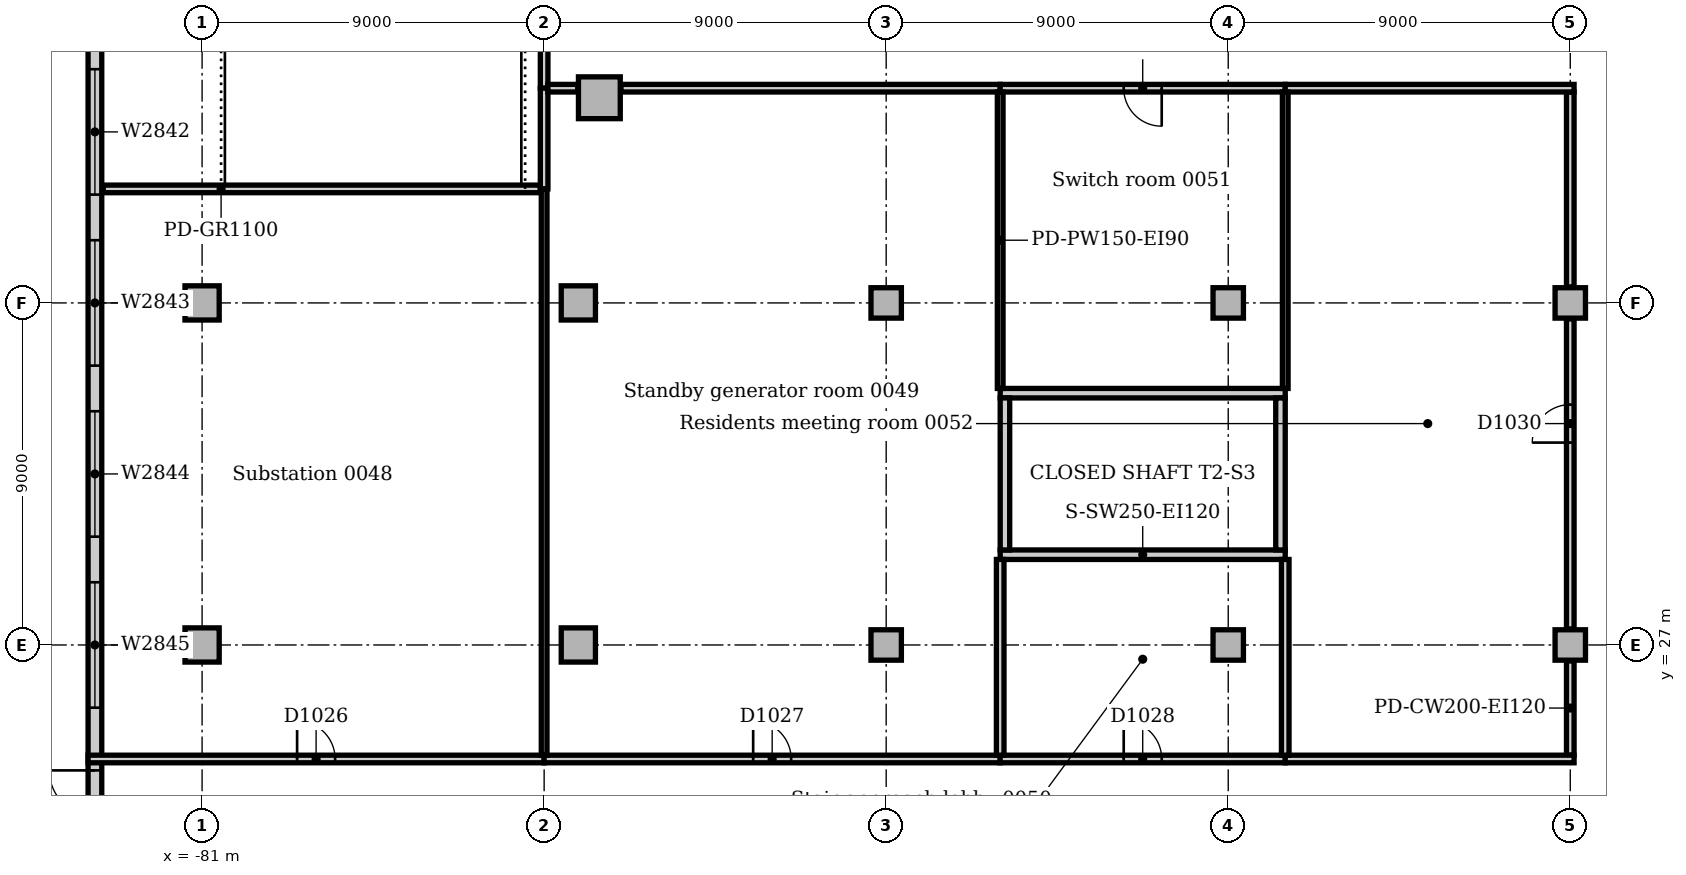
"""IFC4 building model, lengths in metres.
Left out: names, types, materials, properties, quantities, classifications, styles, units other than length and angle.
Written with IfcOpenShell. Run it as: python <this file> out.ifc"""

import sys

from ifc_helpers import new_model, si_unit, direction, frame, frame_2d, origin, origin_2d, place, context, subcontext, project, spatial, rectangle, extrude, element, fill, save


model = new_model("IFC4")
c1 = context("Model", 3, precision=1e-05, world=origin(), true_north=direction((0.0, 1.0)))
c2 = subcontext(c1, "Body", "Model", "MODEL_VIEW")
j1 = project(units=[si_unit("LENGTHUNIT", "METRE"), si_unit("PLANEANGLEUNIT", "RADIAN")], contexts=[c1])
p1 = place(None, origin())
s1 = spatial("IfcSite", under=j1, at=p1, CompositionType="ELEMENT")
p2 = place(p1, origin())
s2 = spatial("IfcBuilding", under=s1, at=p2, CompositionType="ELEMENT")
p3 = place(p2, origin())
s3 = spatial("IfcBuildingStorey", under=s2, at=p3, CompositionType="ELEMENT", Elevation=0.0)
for number, where, z_axis, x_axis in (
    (1, (-60.0, 29.375, 0.0), (0.0, 0.0, 1.0), (1.0, 0.0, 0.0)),
    (2, (-52.5, 33.625, 0.0), (0.0, 0.0, 1.0), (-1.0, 0.0, 0.0)),
):
    element("IfcWall", number, at=place(p3, frame(where, z_axis=z_axis, x_axis=x_axis)), inside=s3, PredefinedType="SOLIDWALL", context=c2, shape_type="SweptSolid", body=[
        extrude(rectangle(XDim=7.5, YDim=0.25, at=frame_2d((3.75, 0.0))), origin(), (0.0, 0.0, 1.0), 6.0),
    ])
for number, where, z_axis, x_axis in (
    (3, (-52.625, 29.5, 0.0), (0.0, 0.0, 1.0), (0.0, 1.0, 0.0)),
    (4, (-59.875, 33.5, 0.0), (0.0, 0.0, 1.0), (0.0, -1.0, 0.0)),
):
    element("IfcWall", number, at=place(p3, frame(where, z_axis=z_axis, x_axis=x_axis)), inside=s3, PredefinedType="SOLIDWALL", context=c2, shape_type="SweptSolid", body=[
        extrude(rectangle(XDim=4.0, YDim=0.25, at=frame_2d((2.0, 0.0))), origin(), (0.0, 0.0, 1.0), 6.0),
    ])
p4 = place(p3, frame((-70.547, 41.398, 0.0), z_axis=(0.0, 0.0, 1.0), x_axis=(1.0, 0.0, 0.0)))
e5 = element("IfcColumn", 5, at=p4, inside=s3, PredefinedType="COLUMN", context=c2, shape_type="SweptSolid", body=[
    extrude(rectangle(XDim=1.1, YDim=1.1, at=origin_2d()), origin(), (0.0, 0.0, 1.0), 5.7),
])
for number, where, z_axis, x_axis in (
    (6, (-71.1, 27.0, 0.0), (0.0, 0.0, 1.0), (1.0, 0.0, 0.0)),
    (7, (-71.1, 36.0, 0.0), (0.0, 0.0, 1.0), (1.0, 0.0, 0.0)),
):
    element("IfcColumn", number, at=place(p3, frame(where, z_axis=z_axis, x_axis=x_axis)), inside=s3, PredefinedType="COLUMN", context=c2, shape_type="SweptSolid", body=[
        extrude(rectangle(XDim=0.9, YDim=0.9, at=origin_2d()), origin(), (0.0, 0.0, 1.0), 5.7),
    ])
for number, where, z_axis, x_axis in (
    (8, (-63.0, 27.0, 0.0), (0.0, 0.0, 1.0), (1.0, 0.0, 0.0)),
    (9, (-63.0, 36.0, 0.0), (0.0, 0.0, 1.0), (1.0, 0.0, 0.0)),
    (10, (-54.0, 27.0, 0.0), (0.0, 0.0, 1.0), (1.0, 0.0, 0.0)),
    (11, (-54.0, 36.0, 0.0), (0.0, 0.0, 1.0), (1.0, 0.0, 0.0)),
    (12, (-45.0, 27.0, 0.0), (0.0, 0.0, 1.0), (1.0, 0.0, 0.0)),
    (13, (-45.0, 36.0, 0.0), (0.0, 0.0, 1.0), (1.0, 0.0, 0.0)),
):
    element("IfcColumn", number, at=place(p3, frame(where, z_axis=z_axis, x_axis=x_axis)), inside=s3, PredefinedType="COLUMN", context=c2, shape_type="SweptSolid", body=[
        extrude(rectangle(XDim=0.8, YDim=0.8, at=origin_2d()), origin(), (0.0, 0.0, 1.0), 5.7),
    ])
for number, where, z_axis, x_axis in (
    (14, (-81.0, 27.0, 0.0), (0.0, 0.0, 1.0), (1.0, 0.0, 0.0)),
    (15, (-81.0, 36.0, 0.0), (0.0, 0.0, 1.0), (1.0, 0.0, 0.0)),
):
    element("IfcColumn", number, at=place(p3, frame(where, z_axis=z_axis, x_axis=x_axis)), inside=s3, PredefinedType="COLUMN", context=c2, shape_type="SweptSolid", body=[
        extrude(rectangle(XDim=0.9, YDim=0.9, at=origin_2d()), origin(), (0.0, 0.0, 1.0), 5.7),
    ])
p5 = place(p3, frame((-83.82, 54.0, 0.0), z_axis=(0.0, 0.0, 1.0), x_axis=(0.0, -1.0, 0.0)))
e16 = element("IfcWall", 16, at=p5, inside=s3, PredefinedType="STANDARD", context=c2, shape_type="SweptSolid", body=[
    extrude(rectangle(XDim=63.0, YDim=0.36, at=frame_2d((31.5, 0.0))), origin(), (0.0, 0.0, 1.0), 5.7),
])
p6 = place(p5, frame((41.4, 0.0, 0.0)))
e17 = element("IfcOpeningElement", 17, at=p6, cuts=e16, PredefinedType="OPENING", context=c2, shape_type="SweptSolid", body=[
    extrude(rectangle(XDim=1.2, YDim=2.2, at=frame_2d((0.6, 1.1))), frame((0.0, 0.19, 0.0), z_axis=(0.0, -1.0, 0.0), x_axis=(1.0, 0.0, 0.0)), (0.0, 0.0, 1.0), 0.38),
])
p7 = place(p5, frame((30.3, 0.0, 0.0)))
e18 = element("IfcOpeningElement", 18, at=p7, cuts=e16, PredefinedType="OPENING", context=c2, shape_type="SweptSolid", body=[
    extrude(rectangle(XDim=2.4, YDim=2.2, at=frame_2d((1.2, 1.1))), frame((0.0, 0.19, 0.0), z_axis=(0.0, -1.0, 0.0), x_axis=(1.0, 0.0, 0.0)), (0.0, 0.0, 1.0), 0.38),
])
p8 = place(p5, frame((11.85, 0.0, 0.6)))
e19 = element("IfcOpeningElement", 19, at=p8, cuts=e16, PredefinedType="OPENING", context=c2, shape_type="SweptSolid", body=[
    extrude(rectangle(XDim=3.3, YDim=3.0, at=frame_2d((1.65, 1.5))), frame((0.0, 0.19, 0.0), z_axis=(0.0, -1.0, 0.0), x_axis=(1.0, 0.0, 0.0)), (0.0, 0.0, 1.0), 0.38),
])
p9 = place(p5, frame((16.35, 0.0, 0.6)))
e20 = element("IfcOpeningElement", 20, at=p9, cuts=e16, PredefinedType="OPENING", context=c2, shape_type="SweptSolid", body=[
    extrude(rectangle(XDim=3.3, YDim=3.0, at=frame_2d((1.65, 1.5))), frame((0.0, 0.19, 0.0), z_axis=(0.0, -1.0, 0.0), x_axis=(1.0, 0.0, 0.0)), (0.0, 0.0, 1.0), 0.38),
])
p10 = place(p5, frame((20.85, 0.0, 0.6)))
e21 = element("IfcOpeningElement", 21, at=p10, cuts=e16, PredefinedType="OPENING", context=c2, shape_type="SweptSolid", body=[
    extrude(rectangle(XDim=3.3, YDim=3.0, at=frame_2d((1.65, 1.5))), frame((0.0, 0.19, 0.0), z_axis=(0.0, -1.0, 0.0), x_axis=(1.0, 0.0, 0.0)), (0.0, 0.0, 1.0), 0.38),
])
p11 = place(p5, frame((25.35, 0.0, 0.6)))
e22 = element("IfcOpeningElement", 22, at=p11, cuts=e16, PredefinedType="OPENING", context=c2, shape_type="SweptSolid", body=[
    extrude(rectangle(XDim=3.3, YDim=3.0, at=frame_2d((1.65, 1.5))), frame((0.0, 0.19, 0.0), z_axis=(0.0, -1.0, 0.0), x_axis=(1.0, 0.0, 0.0)), (0.0, 0.0, 1.0), 0.38),
])
p12 = place(p5, frame((34.35, 0.0, 0.6)))
e23 = element("IfcOpeningElement", 23, at=p12, cuts=e16, PredefinedType="OPENING", context=c2, shape_type="SweptSolid", body=[
    extrude(rectangle(XDim=3.3, YDim=3.0, at=frame_2d((1.65, 1.5))), frame((0.0, 0.19, 0.0), z_axis=(0.0, -1.0, 0.0), x_axis=(1.0, 0.0, 0.0)), (0.0, 0.0, 1.0), 0.38),
])
p13 = place(p5, frame((43.35, 0.0, 0.6)))
e24 = element("IfcOpeningElement", 24, at=p13, cuts=e16, PredefinedType="OPENING", context=c2, shape_type="SweptSolid", body=[
    extrude(rectangle(XDim=3.3, YDim=3.0, at=frame_2d((1.65, 1.5))), frame((0.0, 0.19, 0.0), z_axis=(0.0, -1.0, 0.0), x_axis=(1.0, 0.0, 0.0)), (0.0, 0.0, 1.0), 0.38),
])
p14 = place(p5, frame((47.85, 0.0, 0.6)))
e25 = element("IfcOpeningElement", 25, at=p14, cuts=e16, PredefinedType="OPENING", context=c2, shape_type="SweptSolid", body=[
    extrude(rectangle(XDim=3.3, YDim=3.0, at=frame_2d((1.65, 1.5))), frame((0.0, 0.19, 0.0), z_axis=(0.0, -1.0, 0.0), x_axis=(1.0, 0.0, 0.0)), (0.0, 0.0, 1.0), 0.38),
])
p15 = place(p5, frame((52.35, 0.0, 0.6)))
e26 = element("IfcOpeningElement", 26, at=p15, cuts=e16, PredefinedType="OPENING", context=c2, shape_type="SweptSolid", body=[
    extrude(rectangle(XDim=3.3, YDim=3.0, at=frame_2d((1.65, 1.5))), frame((0.0, 0.19, 0.0), z_axis=(0.0, -1.0, 0.0), x_axis=(1.0, 0.0, 0.0)), (0.0, 0.0, 1.0), 0.38),
])
p16 = place(p5, frame((56.85, 0.0, 0.6)))
e27 = element("IfcOpeningElement", 27, at=p16, cuts=e16, PredefinedType="OPENING", context=c2, shape_type="SweptSolid", body=[
    extrude(rectangle(XDim=3.3, YDim=3.0, at=frame_2d((1.65, 1.5))), frame((0.0, 0.19, 0.0), z_axis=(0.0, -1.0, 0.0), x_axis=(1.0, 0.0, 0.0)), (0.0, 0.0, 1.0), 0.38),
])
p17 = place(p3, frame((-72.0, 41.65, 0.0), z_axis=(0.0, 0.0, 1.0), x_axis=(0.0, 1.0, 0.0)))
e28 = element("IfcWall", 28, at=p17, inside=s3, PredefinedType="PARTITIONING", context=c2, shape_type="SweptSolid", body=[
    extrude(rectangle(XDim=3.35, YDim=0.2, at=frame_2d((1.675, 0.0))), origin(), (0.0, 0.0, 1.0), 5.7),
])
p18 = place(p3, frame((-83.6, 39.0, 0.0), z_axis=(0.0, 0.0, 1.0), x_axis=(1.0, 0.0, 0.0)))
e29 = element("IfcWall", 29, at=p18, inside=s3, PredefinedType="PARTITIONING", context=c2, shape_type="SweptSolid", body=[
    extrude(rectangle(XDim=11.5, YDim=0.2, at=frame_2d((5.75, 0.0))), origin(), (0.0, 0.0, 1.0), 5.7),
])
p19 = place(p3, frame((-72.0, 39.0, 0.0), z_axis=(0.0, 0.0, 1.0), x_axis=(0.0, 1.0, 0.0)))
e30 = element("IfcWall", 30, at=p19, inside=s3, PredefinedType="PARTITIONING", context=c2, shape_type="SweptSolid", body=[
    extrude(rectangle(XDim=2.65, YDim=0.2, at=frame_2d((1.325, 0.0))), origin(), (0.0, 0.0, 1.0), 5.7),
])
p20 = place(p3, frame((-45.0, 24.1, 0.0), z_axis=(0.0, 0.0, 1.0), x_axis=(0.0, 1.0, 0.0)))
e31 = element("IfcWall", 31, at=p20, inside=s3, PredefinedType="PARTITIONING", context=c2, shape_type="SweptSolid", body=[
    extrude(rectangle(XDim=2.48, YDim=0.2, at=frame_2d((1.24, 0.0))), origin(), (0.0, 0.0, 1.0), 5.7),
])
p21 = place(p3, frame((-45.0, 27.42, 0.0), z_axis=(0.0, 0.0, 1.0), x_axis=(0.0, 1.0, 0.0)))
e32 = element("IfcWall", 32, at=p21, inside=s3, PredefinedType="PARTITIONING", context=c2, shape_type="SweptSolid", body=[
    extrude(rectangle(XDim=8.16, YDim=0.2, at=frame_2d((4.08, 0.0))), origin(), (0.0, 0.0, 1.0), 5.7),
])
p22 = place(p21, frame((4.905, 0.0, 0.0)))
e33 = element("IfcOpeningElement", 33, at=p22, cuts=e32, PredefinedType="OPENING", context=c2, shape_type="SweptSolid", body=[
    extrude(rectangle(XDim=1.0, YDim=2.1, at=frame_2d((0.5, 1.05))), frame((0.0, 0.11, 0.0), z_axis=(0.0, -1.0, 0.0), x_axis=(1.0, 0.0, 0.0)), (0.0, 0.0, 1.0), 0.22),
])
p23 = place(p3, frame((-45.0, 36.42, 0.0), z_axis=(0.0, 0.0, 1.0), x_axis=(0.0, 1.0, 0.0)))
e34 = element("IfcWall", 34, at=p23, inside=s3, PredefinedType="PARTITIONING", context=c2, shape_type="SweptSolid", body=[
    extrude(rectangle(XDim=5.13, YDim=0.2, at=frame_2d((2.565, 0.0))), origin(), (0.0, 0.0, 1.0), 5.7),
])
p24 = place(p3, frame((-84.0, 24.0, 0.0), z_axis=(0.0, 0.0, 1.0), x_axis=(1.0, 0.0, 0.0)))
e35 = element("IfcWall", 35, at=p24, inside=s3, PredefinedType="PARTITIONING", context=c2, shape_type="SweptSolid", body=[
    extrude(rectangle(XDim=12.0, YDim=0.2, at=frame_2d((6.0, 0.0))), origin(), (0.0, 0.0, 1.0), 5.7),
])
p25 = place(p24, frame((5.5, 0.0, 0.0)))
e36 = element("IfcOpeningElement", 36, at=p25, cuts=e35, PredefinedType="OPENING", context=c2, shape_type="SweptSolid", body=[
    extrude(rectangle(XDim=1.0, YDim=2.1, at=frame_2d((0.5, 1.05))), frame((0.0, 0.11, 0.0), z_axis=(0.0, -1.0, 0.0), x_axis=(1.0, 0.0, 0.0)), (0.0, 0.0, 1.0), 0.22),
])
p26 = place(p3, frame((-72.0, 24.0, 0.0), z_axis=(0.0, 0.0, 1.0), x_axis=(1.0, 0.0, 0.0)))
e37 = element("IfcWall", 37, at=p26, inside=s3, PredefinedType="PARTITIONING", context=c2, shape_type="SweptSolid", body=[
    extrude(rectangle(XDim=12.0, YDim=0.2, at=frame_2d((6.0, 0.0))), origin(), (0.0, 0.0, 1.0), 5.7),
])
p27 = place(p26, frame((5.5, 0.0, 0.0)))
e38 = element("IfcOpeningElement", 38, at=p27, cuts=e37, PredefinedType="OPENING", context=c2, shape_type="SweptSolid", body=[
    extrude(rectangle(XDim=1.0, YDim=2.1, at=frame_2d((0.5, 1.05))), frame((0.0, 0.11, 0.0), z_axis=(0.0, -1.0, 0.0), x_axis=(1.0, 0.0, 0.0)), (0.0, 0.0, 1.0), 0.22),
])
p28 = place(p3, frame((-60.0, 24.0, 0.0), z_axis=(0.0, 0.0, 1.0), x_axis=(1.0, 0.0, 0.0)))
e39 = element("IfcWall", 39, at=p28, inside=s3, PredefinedType="PARTITIONING", context=c2, shape_type="SweptSolid", body=[
    extrude(rectangle(XDim=7.5, YDim=0.2, at=frame_2d((3.75, 0.0))), origin(), (0.0, 0.0, 1.0), 5.7),
])
p29 = place(p28, frame((3.25, 0.0, 0.0)))
e40 = element("IfcOpeningElement", 40, at=p29, cuts=e39, PredefinedType="OPENING", context=c2, shape_type="SweptSolid", body=[
    extrude(rectangle(XDim=1.0, YDim=2.1, at=frame_2d((0.5, 1.05))), frame((0.0, 0.11, 0.0), z_axis=(0.0, -1.0, 0.0), x_axis=(1.0, 0.0, 0.0)), (0.0, 0.0, 1.0), 0.22),
])
p30 = place(p3, frame((-52.5, 24.0, 0.0), z_axis=(0.0, 0.0, 1.0), x_axis=(1.0, 0.0, 0.0)))
e41 = element("IfcWall", 41, at=p30, inside=s3, PredefinedType="PARTITIONING", context=c2, shape_type="SweptSolid", body=[
    extrude(rectangle(XDim=7.6, YDim=0.2, at=frame_2d((3.8, 0.0))), origin(), (0.0, 0.0, 1.0), 5.7),
])
p31 = place(p3, frame((-71.9, 41.65, 0.0), z_axis=(0.0, 0.0, 1.0), x_axis=(1.0, 0.0, 0.0)))
e42 = element("IfcWall", 42, at=p31, inside=s3, PredefinedType="PARTITIONING", context=c2, shape_type="SweptSolid", body=[
    extrude(rectangle(XDim=0.783, YDim=0.2, at=frame_2d((0.392, 0.0))), origin(), (0.0, 0.0, 1.0), 5.7),
])
p32 = place(p3, frame((-69.977, 41.65, 0.0), z_axis=(0.0, 0.0, 1.0), x_axis=(1.0, 0.0, 0.0)))
e43 = element("IfcWall", 43, at=p32, inside=s3, PredefinedType="PARTITIONING", context=c2, shape_type="SweptSolid", body=[
    extrude(rectangle(XDim=9.977, YDim=0.2, at=frame_2d((4.989, 0.0))), origin(), (0.0, 0.0, 1.0), 5.7),
])
p33 = place(p3, frame((-60.0, 41.65, 0.0), z_axis=(0.0, 0.0, 1.0), x_axis=(1.0, 0.0, 0.0)))
e44 = element("IfcWall", 44, at=p33, inside=s3, PredefinedType="PARTITIONING", context=c2, shape_type="SweptSolid", body=[
    extrude(rectangle(XDim=7.5, YDim=0.2, at=frame_2d((3.75, 0.0))), origin(), (0.0, 0.0, 1.0), 5.7),
])
p34 = place(p33, frame((3.25, 0.0, 0.0)))
e45 = element("IfcOpeningElement", 45, at=p34, cuts=e44, PredefinedType="OPENING", context=c2, shape_type="SweptSolid", body=[
    extrude(rectangle(XDim=1.0, YDim=2.1, at=frame_2d((0.5, 1.05))), frame((0.0, 0.11, 0.0), z_axis=(0.0, -1.0, 0.0), x_axis=(1.0, 0.0, 0.0)), (0.0, 0.0, 1.0), 0.22),
])
p35 = place(p3, frame((-52.5, 41.65, 0.0), z_axis=(0.0, 0.0, 1.0), x_axis=(1.0, 0.0, 0.0)))
e46 = element("IfcWall", 46, at=p35, inside=s3, PredefinedType="PARTITIONING", context=c2, shape_type="SweptSolid", body=[
    extrude(rectangle(XDim=7.6, YDim=0.2, at=frame_2d((3.8, 0.0))), origin(), (0.0, 0.0, 1.0), 5.7),
])
p36 = place(p3, frame((-72.0, 24.1, 0.0), z_axis=(0.0, 0.0, 1.0), x_axis=(0.0, 1.0, 0.0)))
e47 = element("IfcWall", 47, at=p36, inside=s3, PredefinedType="PARTITIONING", context=c2, shape_type="SweptSolid", body=[
    extrude(rectangle(XDim=14.9, YDim=0.15, at=frame_2d((7.45, 0.0))), origin(), (0.0, 0.0, 1.0), 5.7),
])
p37 = place(p3, frame((-60.0, 24.1, 0.0), z_axis=(0.0, 0.0, 1.0), x_axis=(0.0, 1.0, 0.0)))
e48 = element("IfcWall", 48, at=p37, inside=s3, PredefinedType="PARTITIONING", context=c2, shape_type="SweptSolid", body=[
    extrude(rectangle(XDim=5.15, YDim=0.2, at=frame_2d((2.575, 0.0))), origin(), (0.0, 0.0, 1.0), 5.7),
])
p38 = place(p3, frame((-60.0, 33.75, 0.0), z_axis=(0.0, 0.0, 1.0), x_axis=(0.0, 1.0, 0.0)))
e49 = element("IfcWall", 49, at=p38, inside=s3, PredefinedType="PARTITIONING", context=c2, shape_type="SweptSolid", body=[
    extrude(rectangle(XDim=7.8, YDim=0.15, at=frame_2d((3.9, 0.0))), origin(), (0.0, 0.0, 1.0), 5.7),
])
p39 = place(p3, frame((-52.5, 24.1, 0.0), z_axis=(0.0, 0.0, 1.0), x_axis=(0.0, 1.0, 0.0)))
e50 = element("IfcWall", 50, at=p39, inside=s3, PredefinedType="PARTITIONING", context=c2, shape_type="SweptSolid", body=[
    extrude(rectangle(XDim=5.15, YDim=0.2, at=frame_2d((2.575, 0.0))), origin(), (0.0, 0.0, 1.0), 5.7),
])
p40 = place(p3, frame((-52.5, 33.75, 0.0), z_axis=(0.0, 0.0, 1.0), x_axis=(0.0, 1.0, 0.0)))
e51 = element("IfcWall", 51, at=p40, inside=s3, PredefinedType="PARTITIONING", context=c2, shape_type="SweptSolid", body=[
    extrude(rectangle(XDim=7.8, YDim=0.15, at=frame_2d((3.9, 0.0))), origin(), (0.0, 0.0, 1.0), 5.7),
])
p41 = place(p7, frame((2.4, 0.0, 0.0), z_axis=(0.0, 0.0, 1.0), x_axis=(-1.0, 0.0, 0.0)))
e52 = element("IfcDoor", 52, at=p41, inside=s3, OperationType="DOUBLE_DOOR_SINGLE_SWING", PredefinedType="DOOR", context=c2, shape_type="SweptSolid", body=[
    extrude(rectangle(XDim=2.4, YDim=2.2, at=frame_2d((1.2, 1.1))), frame((0.0, -0.07, 0.0), z_axis=(0.0, -1.0, 0.0), x_axis=(1.0, 0.0, 0.0)), (0.0, 0.0, 1.0), 0.05),
])
fill(e18, e52)
p42 = place(p8, origin())
e53 = element("IfcWindow", 53, at=p42, inside=s3, PartitioningType="SINGLE_PANEL", PredefinedType="WINDOW", context=c2, shape_type="SweptSolid", body=[
    extrude(rectangle(XDim=3.3, YDim=3.0, at=frame_2d((1.65, 1.5))), frame((0.0, 0.13, 0.0), z_axis=(0.0, -1.0, 0.0), x_axis=(1.0, 0.0, 0.0)), (0.0, 0.0, 1.0), 0.06),
])
fill(e19, e53)
p43 = place(p9, origin())
e54 = element("IfcWindow", 54, at=p43, inside=s3, PartitioningType="SINGLE_PANEL", PredefinedType="WINDOW", context=c2, shape_type="SweptSolid", body=[
    extrude(rectangle(XDim=3.3, YDim=3.0, at=frame_2d((1.65, 1.5))), frame((0.0, 0.13, 0.0), z_axis=(0.0, -1.0, 0.0), x_axis=(1.0, 0.0, 0.0)), (0.0, 0.0, 1.0), 0.06),
])
fill(e20, e54)
p44 = place(p10, origin())
e55 = element("IfcWindow", 55, at=p44, inside=s3, PartitioningType="SINGLE_PANEL", PredefinedType="WINDOW", context=c2, shape_type="SweptSolid", body=[
    extrude(rectangle(XDim=3.3, YDim=3.0, at=frame_2d((1.65, 1.5))), frame((0.0, 0.13, 0.0), z_axis=(0.0, -1.0, 0.0), x_axis=(1.0, 0.0, 0.0)), (0.0, 0.0, 1.0), 0.06),
])
fill(e21, e55)
p45 = place(p11, origin())
e56 = element("IfcWindow", 56, at=p45, inside=s3, PartitioningType="SINGLE_PANEL", PredefinedType="WINDOW", context=c2, shape_type="SweptSolid", body=[
    extrude(rectangle(XDim=3.3, YDim=3.0, at=frame_2d((1.65, 1.5))), frame((0.0, 0.13, 0.0), z_axis=(0.0, -1.0, 0.0), x_axis=(1.0, 0.0, 0.0)), (0.0, 0.0, 1.0), 0.06),
])
fill(e22, e56)
p46 = place(p25, origin())
e57 = element("IfcDoor", 57, at=p46, inside=s3, OperationType="SINGLE_SWING_LEFT", PredefinedType="DOOR", context=c2, shape_type="SweptSolid", body=[
    extrude(rectangle(XDim=1.0, YDim=2.1, at=frame_2d((0.5, 1.05))), frame((0.0, 0.025, 0.0), z_axis=(0.0, -1.0, 0.0), x_axis=(1.0, 0.0, 0.0)), (0.0, 0.0, 1.0), 0.05),
])
fill(e36, e57)
p47 = place(p27, origin())
e58 = element("IfcDoor", 58, at=p47, inside=s3, OperationType="SINGLE_SWING_LEFT", PredefinedType="DOOR", context=c2, shape_type="SweptSolid", body=[
    extrude(rectangle(XDim=1.0, YDim=2.1, at=frame_2d((0.5, 1.05))), frame((0.0, 0.025, 0.0), z_axis=(0.0, -1.0, 0.0), x_axis=(1.0, 0.0, 0.0)), (0.0, 0.0, 1.0), 0.05),
])
fill(e38, e58)
p48 = place(p29, origin())
e59 = element("IfcDoor", 59, at=p48, inside=s3, OperationType="SINGLE_SWING_LEFT", PredefinedType="DOOR", context=c2, shape_type="SweptSolid", body=[
    extrude(rectangle(XDim=1.0, YDim=2.1, at=frame_2d((0.5, 1.05))), frame((0.0, 0.025, 0.0), z_axis=(0.0, -1.0, 0.0), x_axis=(1.0, 0.0, 0.0)), (0.0, 0.0, 1.0), 0.05),
])
fill(e40, e59)
p49 = place(p34, frame((1.0, 0.0, 0.0), z_axis=(0.0, 0.0, 1.0), x_axis=(-1.0, 0.0, 0.0)))
e60 = element("IfcDoor", 60, at=p49, inside=s3, OperationType="SINGLE_SWING_LEFT", PredefinedType="DOOR", context=c2, shape_type="SweptSolid", body=[
    extrude(rectangle(XDim=1.0, YDim=2.1, at=frame_2d((0.5, 1.05))), frame((0.0, 0.025, 0.0), z_axis=(0.0, -1.0, 0.0), x_axis=(1.0, 0.0, 0.0)), (0.0, 0.0, 1.0), 0.05),
])
fill(e45, e60)
p50 = place(p22, origin())
e61 = element("IfcDoor", 61, at=p50, inside=s3, OperationType="SINGLE_SWING_LEFT", PredefinedType="DOOR", context=c2, shape_type="SweptSolid", body=[
    extrude(rectangle(XDim=1.0, YDim=2.1, at=frame_2d((0.5, 1.05))), frame((0.0, 0.025, 0.0), z_axis=(0.0, -1.0, 0.0), x_axis=(1.0, 0.0, 0.0)), (0.0, 0.0, 1.0), 0.05),
])
fill(e33, e61)
save(model, sys.argv[1])
